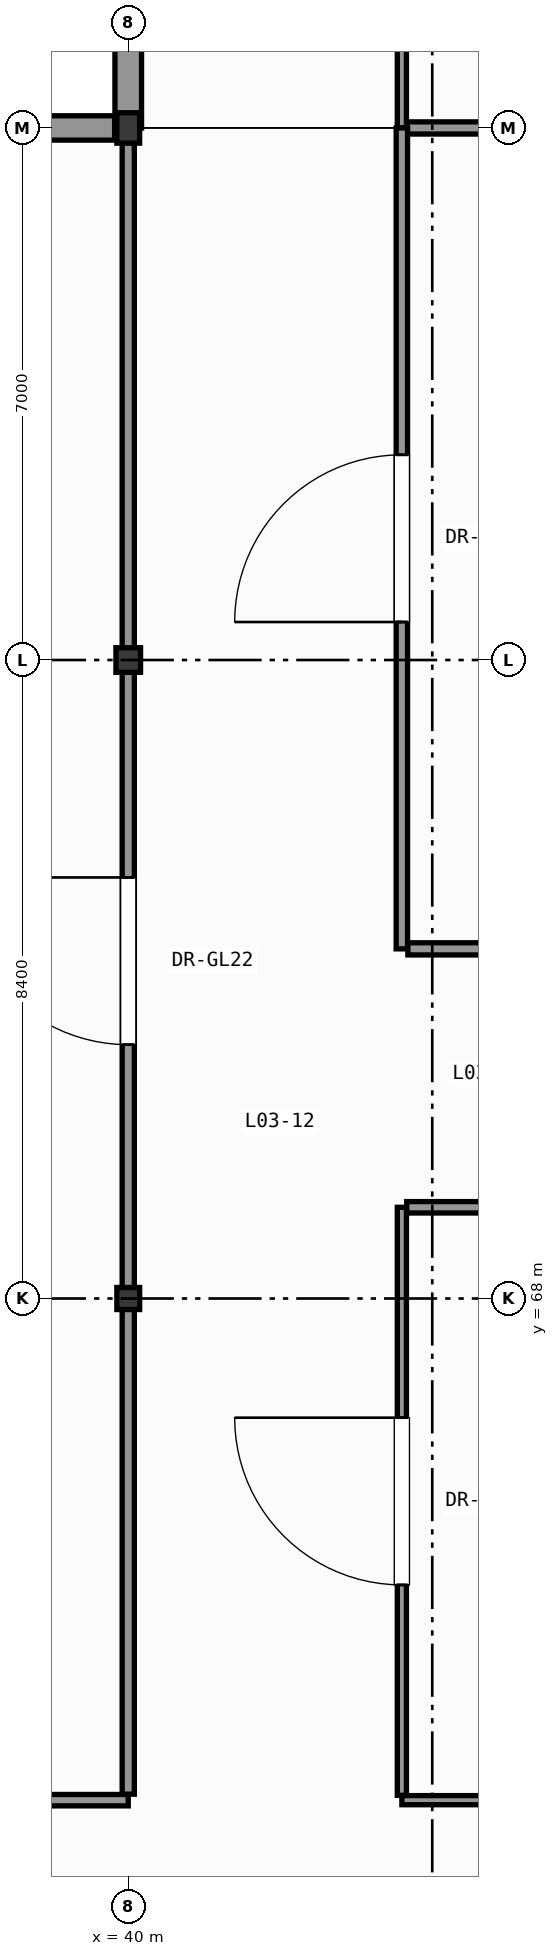
"""IFC4 building model, lengths in metres.
Left out: names, types, materials, properties, quantities, classifications, styles, units other than length and angle.
Written with IfcOpenShell. Run it as: python <this file> out.ifc"""

import sys

from ifc_helpers import new_model, si_unit, direction, frame, frame_2d, origin, origin_2d, place, context, subcontext, project, spatial, rectangle, hollow_circle, i_section, extrude, element, fill, save


model = new_model("IFC4")
c1 = context("Model", 3, precision=1e-05, world=origin(), true_north=direction((0.0, 1.0)))
c2 = subcontext(c1, "Body", "Model", "MODEL_VIEW")
j1 = project(units=[si_unit("LENGTHUNIT", "METRE"), si_unit("PLANEANGLEUNIT", "RADIAN")], contexts=[c1])
p1 = place(None, origin())
s1 = spatial("IfcSite", under=j1, at=p1, CompositionType="ELEMENT")
p2 = place(p1, origin())
s2 = spatial("IfcBuilding", under=s1, at=p2, CompositionType="ELEMENT")
p3 = place(p2, frame((0.0, 0.0, 13.2)))
s3 = spatial("IfcBuildingStorey", under=s2, at=p3, CompositionType="ELEMENT", Elevation=13.2)
p4 = place(p3, frame((40.0, 68.0, 0.0), z_axis=(0.0, 0.0, 1.0), x_axis=(1.0, 0.0, 0.0)))
e1 = element("IfcColumn", 1, at=p4, inside=s3, PredefinedType="COLUMN", context=c2, shape_type="SweptSolid", body=[
    extrude(i_section(OverallWidth=0.3, OverallDepth=0.29, WebThickness=0.009, FlangeThickness=0.014, FilletRadius=0.027, at=origin_2d()), origin(), (0.0, 0.0, 1.0), 4.8),
])
p5 = place(p3, frame((40.0, 76.4, 0.0), z_axis=(0.0, 0.0, 1.0), x_axis=(1.0, 0.0, 0.0)))
e2 = element("IfcColumn", 2, at=p5, inside=s3, PredefinedType="COLUMN", context=c2, shape_type="SweptSolid", body=[
    extrude(hollow_circle(Radius=0.162, WallThickness=0.016, at=origin_2d()), origin(), (0.0, 0.0, 1.0), 4.8),
])
p6 = place(p3, frame((40.0, 83.4, 0.0), z_axis=(0.0, 0.0, 1.0), x_axis=(1.0, 0.0, 0.0)))
e3 = element("IfcColumn", 3, at=p6, inside=s3, PredefinedType="COLUMN", context=c2, shape_type="SweptSolid", body=[
    extrude(i_section(OverallWidth=0.3, OverallDepth=0.4, WebThickness=0.013, FlangeThickness=0.024, FilletRadius=0.027, at=origin_2d()), origin(), (0.0, 0.0, 1.0), 4.8),
])
p7 = place(p3, frame((40.0, 83.4, 0.0), z_axis=(0.0, 0.0, 1.0), x_axis=(0.0, 1.0, 0.0)))
e4 = element("IfcWall", 4, at=p7, inside=s3, PredefinedType="SOLIDWALL", context=c2, shape_type="SweptSolid", body=[
    extrude(rectangle(XDim=7.0, YDim=0.35, at=frame_2d((3.5, 0.0))), origin(), (0.0, 0.0, 1.0), 4.045),
])
p8 = place(p7, frame((1.558, 0.0, 0.95)))
e5 = element("IfcOpeningElement", 5, at=p8, cuts=e4, PredefinedType="OPENING", context=c2, shape_type="SweptSolid", body=[
    extrude(rectangle(XDim=1.55, YDim=2.1, at=frame_2d((0.775, 1.05))), frame((0.0, 0.185, 0.0), z_axis=(0.0, -1.0, 0.0), x_axis=(1.0, 0.0, 0.0)), (0.0, 0.0, 1.0), 0.37),
])
p9 = place(p7, frame((3.892, 0.0, 0.95)))
e6 = element("IfcOpeningElement", 6, at=p9, cuts=e4, PredefinedType="OPENING", context=c2, shape_type="SweptSolid", body=[
    extrude(rectangle(XDim=1.55, YDim=2.1, at=frame_2d((0.775, 1.05))), frame((0.0, 0.185, 0.0), z_axis=(0.0, -1.0, 0.0), x_axis=(1.0, 0.0, 0.0)), (0.0, 0.0, 1.0), 0.37),
])
p10 = place(p3, frame((32.0, 83.4, 0.0), z_axis=(0.0, 0.0, 1.0), x_axis=(1.0, 0.0, 0.0)))
e7 = element("IfcWall", 7, at=p10, inside=s3, PredefinedType="SOLIDWALL", context=c2, shape_type="SweptSolid", body=[
    extrude(rectangle(XDim=7.821, YDim=0.32, at=frame_2d((3.911, 0.0))), origin(), (0.0, 0.0, 1.0), 4.265),
])
p11 = place(p10, frame((1.632, 0.0, 0.95)))
e8 = element("IfcOpeningElement", 8, at=p11, cuts=e7, PredefinedType="OPENING", context=c2, shape_type="SweptSolid", body=[
    extrude(rectangle(XDim=1.95, YDim=2.55, at=frame_2d((0.975, 1.275))), frame((0.0, 0.17, 0.0), z_axis=(0.0, -1.0, 0.0), x_axis=(1.0, 0.0, 0.0)), (0.0, 0.0, 1.0), 0.34),
])
p12 = place(p10, frame((4.239, 0.0, 0.95)))
e9 = element("IfcOpeningElement", 9, at=p12, cuts=e7, PredefinedType="OPENING", context=c2, shape_type="SweptSolid", body=[
    extrude(rectangle(XDim=1.95, YDim=2.55, at=frame_2d((0.975, 1.275))), frame((0.0, 0.17, 0.0), z_axis=(0.0, -1.0, 0.0), x_axis=(1.0, 0.0, 0.0)), (0.0, 0.0, 1.0), 0.34),
])
p13 = place(p3, frame((43.6, 83.4, 0.0), z_axis=(0.0, 0.0, 1.0), x_axis=(0.0, 1.0, 0.0)))
e10 = element("IfcWall", 10, at=p13, inside=s3, PredefinedType="PARTITIONING", context=c2, shape_type="SweptSolid", body=[
    extrude(rectangle(XDim=29.721, YDim=0.12, at=frame_2d((14.861, 0.0))), origin(), (0.0, 0.0, 1.0), 4.56),
])
p14 = place(p13, frame((14.335, 0.0, 0.0)))
e11 = element("IfcOpeningElement", 11, at=p14, cuts=e10, PredefinedType="OPENING", context=c2, shape_type="SweptSolid", body=[
    extrude(rectangle(XDim=1.05, YDim=2.2, at=frame_2d((0.525, 1.1))), frame((0.0, 0.07, 0.0), z_axis=(0.0, -1.0, 0.0), x_axis=(1.0, 0.0, 0.0)), (0.0, 0.0, 1.0), 0.14),
])
p15 = place(p3, frame((43.664, 83.4, 0.0), z_axis=(0.0, 0.0, 1.0), x_axis=(1.0, 0.0, 0.0)))
e12 = element("IfcWall", 12, at=p15, inside=s3, PredefinedType="PARTITIONING", context=c2, shape_type="SweptSolid", body=[
    extrude(rectangle(XDim=4.336, YDim=0.16, at=frame_2d((2.168, 0.0))), origin(), (0.0, 0.0, 1.0), 4.225),
])
p16 = place(p15, frame((1.668, 0.0, 0.0)))
e13 = element("IfcOpeningElement", 13, at=p16, cuts=e12, PredefinedType="OPENING", context=c2, shape_type="SweptSolid", body=[
    extrude(rectangle(XDim=1.0, YDim=2.15, at=frame_2d((0.5, 1.075))), frame((0.0, 0.09, 0.0), z_axis=(0.0, -1.0, 0.0), x_axis=(1.0, 0.0, 0.0)), (0.0, 0.0, 1.0), 0.18),
])
p17 = place(p3, frame((9.779, 61.4, 0.0), z_axis=(0.0, 0.0, 1.0), x_axis=(1.0, 0.0, 0.0)))
e14 = element("IfcWall", 14, at=p17, inside=s3, PredefinedType="PARTITIONING", context=c2, shape_type="SweptSolid", body=[
    extrude(rectangle(XDim=30.221, YDim=0.15, at=frame_2d((15.11, 0.0))), origin(), (0.0, 0.0, 1.0), 4.56),
])
p18 = place(p17, frame((14.01, 0.0, 0.0)))
e15 = element("IfcOpeningElement", 15, at=p18, cuts=e14, PredefinedType="OPENING", context=c2, shape_type="SweptSolid", body=[
    extrude(rectangle(XDim=2.2, YDim=2.6, at=frame_2d((1.1, 1.3))), frame((0.0, 0.085, 0.0), z_axis=(0.0, -1.0, 0.0), x_axis=(1.0, 0.0, 0.0)), (0.0, 0.0, 1.0), 0.17),
])
p19 = place(p3, frame((43.6, 61.4, 0.0), z_axis=(0.0, 0.0, 1.0), x_axis=(1.0, 0.0, 0.0)))
e16 = element("IfcWall", 16, at=p19, inside=s3, PredefinedType="PARTITIONING", context=c2, shape_type="SweptSolid", body=[
    extrude(rectangle(XDim=26.4, YDim=0.12, at=frame_2d((13.2, 0.0))), origin(), (0.0, 0.0, 1.0), 4.56),
])
p20 = place(p19, frame((12.1, 0.0, 0.0)))
e17 = element("IfcOpeningElement", 17, at=p20, cuts=e16, PredefinedType="OPENING", context=c2, shape_type="SweptSolid", body=[
    extrude(rectangle(XDim=2.2, YDim=2.6, at=frame_2d((1.1, 1.3))), frame((0.0, 0.07, 0.0), z_axis=(0.0, -1.0, 0.0), x_axis=(1.0, 0.0, 0.0)), (0.0, 0.0, 1.0), 0.14),
])
p21 = place(p3, frame((40.0, 61.479, 0.0), z_axis=(0.0, 0.0, 1.0), x_axis=(0.0, 1.0, 0.0)))
e18 = element("IfcWall", 18, at=p21, inside=s3, PredefinedType="PARTITIONING", context=c2, shape_type="SweptSolid", body=[
    extrude(rectangle(XDim=21.921, YDim=0.16, at=frame_2d((10.96, 0.0))), origin(), (0.0, 0.0, 1.0), 4.045),
])
p22 = place(p21, frame((9.861, 0.0, 0.0)))
e19 = element("IfcOpeningElement", 19, at=p22, cuts=e18, PredefinedType="OPENING", context=c2, shape_type="SweptSolid", body=[
    extrude(rectangle(XDim=2.2, YDim=2.6, at=frame_2d((1.1, 1.3))), frame((0.0, 0.09, 0.0), z_axis=(0.0, -1.0, 0.0), x_axis=(1.0, 0.0, 0.0)), (0.0, 0.0, 1.0), 0.18),
])
p23 = place(p3, frame((43.6, 72.6, 0.0), z_axis=(0.0, 0.0, 1.0), x_axis=(0.0, 1.0, 0.0)))
e20 = element("IfcWall", 20, at=p23, inside=s3, PredefinedType="PARTITIONING", context=c2, shape_type="SweptSolid", body=[
    extrude(rectangle(XDim=10.8, YDim=0.15, at=frame_2d((5.4, 0.0))), origin(), (0.0, 0.0, 1.0), 4.56),
])
p24 = place(p23, frame((4.3, 0.0, 0.0)))
e21 = element("IfcOpeningElement", 21, at=p24, cuts=e20, PredefinedType="OPENING", context=c2, shape_type="SweptSolid", body=[
    extrude(rectangle(XDim=2.2, YDim=2.6, at=frame_2d((1.1, 1.3))), frame((0.0, 0.085, 0.0), z_axis=(0.0, -1.0, 0.0), x_axis=(1.0, 0.0, 0.0)), (0.0, 0.0, 1.0), 0.17),
])
p25 = place(p3, frame((43.6, 61.464, 0.0), z_axis=(0.0, 0.0, 1.0), x_axis=(0.0, 1.0, 0.0)))
e22 = element("IfcWall", 22, at=p25, inside=s3, PredefinedType="PARTITIONING", context=c2, shape_type="SweptSolid", body=[
    extrude(rectangle(XDim=7.736, YDim=0.12, at=frame_2d((3.868, 0.0))), origin(), (0.0, 0.0, 1.0), 4.56),
])
p26 = place(p25, frame((2.768, 0.0, 0.0)))
e23 = element("IfcOpeningElement", 23, at=p26, cuts=e22, PredefinedType="OPENING", context=c2, shape_type="SweptSolid", body=[
    extrude(rectangle(XDim=2.2, YDim=2.6, at=frame_2d((1.1, 1.3))), frame((0.0, 0.07, 0.0), z_axis=(0.0, -1.0, 0.0), x_axis=(1.0, 0.0, 0.0)), (0.0, 0.0, 1.0), 0.14),
])
p27 = place(p3, frame((43.679, 72.6, 0.0), z_axis=(0.0, 0.0, 1.0), x_axis=(1.0, 0.0, 0.0)))
e24 = element("IfcWall", 24, at=p27, inside=s3, PredefinedType="PARTITIONING", context=c2, shape_type="SweptSolid", body=[
    extrude(rectangle(XDim=4.571, YDim=0.16, at=frame_2d((2.286, 0.0))), origin(), (0.0, 0.0, 1.0), 4.56),
])
p28 = place(p27, frame((1.385, 0.0, 0.0)))
e25 = element("IfcOpeningElement", 25, at=p28, cuts=e24, PredefinedType="OPENING", context=c2, shape_type="SweptSolid", body=[
    extrude(rectangle(XDim=1.8, YDim=2.4, at=frame_2d((0.9, 1.2))), frame((0.0, 0.09, 0.0), z_axis=(0.0, -1.0, 0.0), x_axis=(1.0, 0.0, 0.0)), (0.0, 0.0, 1.0), 0.18),
])
p29 = place(p3, frame((43.664, 69.2, 0.0), z_axis=(0.0, 0.0, 1.0), x_axis=(1.0, 0.0, 0.0)))
e26 = element("IfcWall", 26, at=p29, inside=s3, PredefinedType="PARTITIONING", context=c2, shape_type="SweptSolid", body=[
    extrude(rectangle(XDim=4.586, YDim=0.15, at=frame_2d((2.293, 0.0))), origin(), (0.0, 0.0, 1.0), 4.56),
])
p30 = place(p29, frame((1.393, 0.0, 0.0)))
e27 = element("IfcOpeningElement", 27, at=p30, cuts=e26, PredefinedType="OPENING", context=c2, shape_type="SweptSolid", body=[
    extrude(rectangle(XDim=1.8, YDim=2.4, at=frame_2d((0.9, 1.2))), frame((0.0, 0.085, 0.0), z_axis=(0.0, -1.0, 0.0), x_axis=(1.0, 0.0, 0.0)), (0.0, 0.0, 1.0), 0.17),
])
p31 = place(p22, origin())
e28 = element("IfcDoor", 28, at=p31, inside=s3, OperationType="SINGLE_SWING_RIGHT", PredefinedType="DOOR", context=c2, shape_type="SweptSolid", body=[
    extrude(rectangle(XDim=2.2, YDim=2.6, at=frame_2d((1.1, 1.3))), frame((0.0, 0.025, 0.0), z_axis=(0.0, -1.0, 0.0), x_axis=(1.0, 0.0, 0.0)), (0.0, 0.0, 1.0), 0.05),
])
fill(e19, e28)
p32 = place(p24, origin())
e29 = element("IfcDoor", 29, at=p32, inside=s3, OperationType="SINGLE_SWING_LEFT", PredefinedType="DOOR", context=c2, shape_type="SweptSolid", body=[
    extrude(rectangle(XDim=2.2, YDim=2.6, at=frame_2d((1.1, 1.3))), frame((0.0, 0.025, 0.0), z_axis=(0.0, -1.0, 0.0), x_axis=(1.0, 0.0, 0.0)), (0.0, 0.0, 1.0), 0.05),
])
fill(e21, e29)
p33 = place(p26, origin())
e30 = element("IfcDoor", 30, at=p33, inside=s3, OperationType="SINGLE_SWING_RIGHT", PredefinedType="DOOR", context=c2, shape_type="SweptSolid", body=[
    extrude(rectangle(XDim=2.2, YDim=2.6, at=frame_2d((1.1, 1.3))), frame((0.0, 0.025, 0.0), z_axis=(0.0, -1.0, 0.0), x_axis=(1.0, 0.0, 0.0)), (0.0, 0.0, 1.0), 0.05),
])
fill(e23, e30)
save(model, sys.argv[1])
